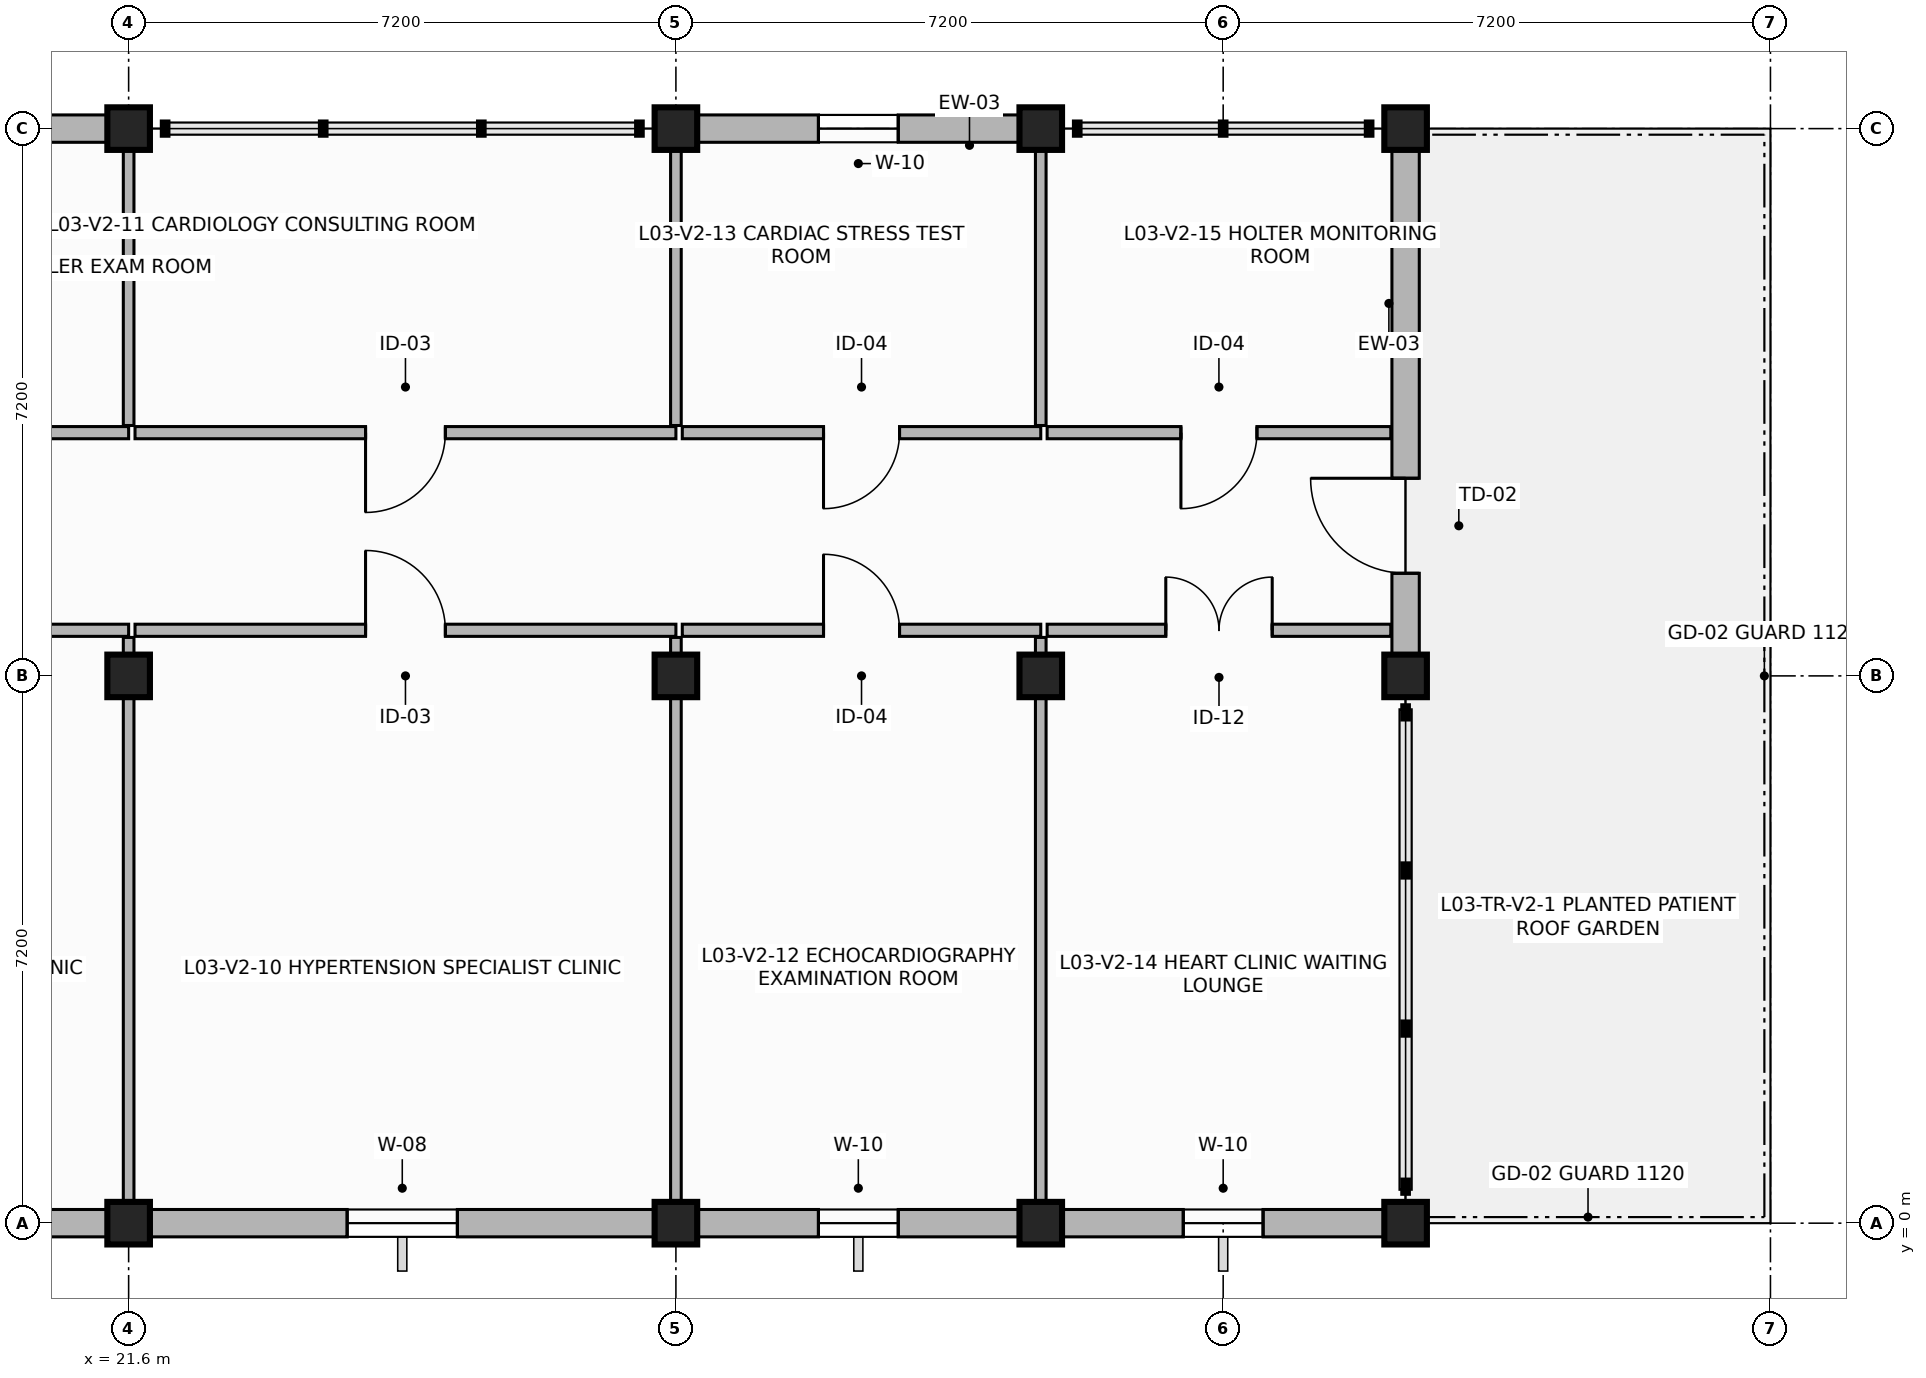
"""IFC4 building model, lengths in metres.
Left out: names, types, materials, properties, quantities, classifications, styles, units other than length and angle.
Written with IfcOpenShell. Run it as: python <this file> out.ifc"""

import sys

from ifc_helpers import new_model, si_unit, direction, frame, frame_2d, origin, origin_2d, place, context, subcontext, project, spatial, rectangle, extrude, element, fill, save


model = new_model("IFC4")
c1 = context("Model", 3, precision=1e-05, world=origin(), true_north=direction((0.0, 1.0)))
c2 = subcontext(c1, "Body", "Model", "MODEL_VIEW")
j1 = project(units=[si_unit("LENGTHUNIT", "METRE"), si_unit("PLANEANGLEUNIT", "RADIAN")], contexts=[c1])
p1 = place(None, origin())
s1 = spatial("IfcSite", under=j1, at=p1, CompositionType="ELEMENT")
p2 = place(p1, origin())
s2 = spatial("IfcBuilding", under=s1, at=p2, CompositionType="ELEMENT")
p3 = place(p2, frame((0.0, 0.0, 12.3)))
s3 = spatial("IfcBuildingStorey", under=s2, at=p3, CompositionType="ELEMENT", Elevation=12.3)
for number, where, z_axis, x_axis in (
    (1, (21.6, 0.0, 0.0), (0.0, 0.0, 1.0), (1.0, 0.0, 0.0)),
    (2, (21.6, 7.2, 0.0), (0.0, 0.0, 1.0), (1.0, 0.0, 0.0)),
    (3, (21.6, 14.4, 0.0), (0.0, 0.0, 1.0), (1.0, 0.0, 0.0)),
    (4, (28.8, 0.0, 0.0), (0.0, 0.0, 1.0), (1.0, 0.0, 0.0)),
    (5, (28.8, 7.2, 0.0), (0.0, 0.0, 1.0), (1.0, 0.0, 0.0)),
    (6, (28.8, 14.4, 0.0), (0.0, 0.0, 1.0), (1.0, 0.0, 0.0)),
    (7, (33.6, 0.0, 0.0), (0.0, 0.0, 1.0), (1.0, 0.0, 0.0)),
    (8, (33.6, 7.2, 0.0), (0.0, 0.0, 1.0), (1.0, 0.0, 0.0)),
    (9, (33.6, 14.4, 0.0), (0.0, 0.0, 1.0), (1.0, 0.0, 0.0)),
    (10, (38.4, 0.0, 0.0), (0.0, 0.0, 1.0), (1.0, 0.0, 0.0)),
    (11, (38.4, 7.2, 0.0), (0.0, 0.0, 1.0), (1.0, 0.0, 0.0)),
    (12, (38.4, 14.4, 0.0), (0.0, 0.0, 1.0), (1.0, 0.0, 0.0)),
):
    element("IfcColumn", number, at=place(p3, frame(where, z_axis=z_axis, x_axis=x_axis)), inside=s3, PredefinedType="COLUMN", context=c2, shape_type="SweptSolid", body=[
        extrude(rectangle(XDim=0.56, YDim=0.56, at=origin_2d()), origin(), (0.0, 0.0, 1.0), 3.42),
    ])
p4 = place(p3, frame((14.4, 0.0, 0.0), z_axis=(0.0, 0.0, 1.0), x_axis=(1.0, 0.0, 0.0)))
e13 = element("IfcWall", 13, at=p4, inside=s3, PredefinedType="SOLIDWALL", context=c2, shape_type="SweptSolid", body=[
    extrude(rectangle(XDim=7.2, YDim=0.36, at=frame_2d((3.6, 0.0))), origin(), (0.0, 0.0, 1.0), 2.8),
])
p5 = place(p4, frame((2.875, 0.0, 0.85)))
e14 = element("IfcOpeningElement", 14, at=p5, cuts=e13, PredefinedType="OPENING", context=c2, shape_type="SweptSolid", body=[
    extrude(rectangle(XDim=1.45, YDim=1.75, at=frame_2d((0.725, 0.875))), frame((0.0, 0.19, 0.0), z_axis=(0.0, -1.0, 0.0), x_axis=(1.0, 0.0, 0.0)), (0.0, 0.0, 1.0), 0.38),
])
p6 = place(p3, frame((21.6, 0.0, 0.0), z_axis=(0.0, 0.0, 1.0), x_axis=(1.0, 0.0, 0.0)))
e15 = element("IfcWall", 15, at=p6, inside=s3, PredefinedType="SOLIDWALL", context=c2, shape_type="SweptSolid", body=[
    extrude(rectangle(XDim=7.2, YDim=0.36, at=frame_2d((3.6, 0.0))), origin(), (0.0, 0.0, 1.0), 2.8),
])
p7 = place(p6, frame((2.875, 0.0, 0.85)))
e16 = element("IfcOpeningElement", 16, at=p7, cuts=e15, PredefinedType="OPENING", context=c2, shape_type="SweptSolid", body=[
    extrude(rectangle(XDim=1.45, YDim=1.75, at=frame_2d((0.725, 0.875))), frame((0.0, 0.19, 0.0), z_axis=(0.0, -1.0, 0.0), x_axis=(1.0, 0.0, 0.0)), (0.0, 0.0, 1.0), 0.38),
])
p8 = place(p3, frame((28.8, 0.0, 0.0), z_axis=(0.0, 0.0, 1.0), x_axis=(1.0, 0.0, 0.0)))
e17 = element("IfcWall", 17, at=p8, inside=s3, PredefinedType="SOLIDWALL", context=c2, shape_type="SweptSolid", body=[
    extrude(rectangle(XDim=4.8, YDim=0.36, at=frame_2d((2.4, 0.0))), origin(), (0.0, 0.0, 1.0), 2.8),
])
p9 = place(p8, frame((1.875, 0.0, 0.85)))
e18 = element("IfcOpeningElement", 18, at=p9, cuts=e17, PredefinedType="OPENING", context=c2, shape_type="SweptSolid", body=[
    extrude(rectangle(XDim=1.05, YDim=1.7, at=frame_2d((0.525, 0.85))), frame((0.0, 0.19, 0.0), z_axis=(0.0, -1.0, 0.0), x_axis=(1.0, 0.0, 0.0)), (0.0, 0.0, 1.0), 0.38),
])
p10 = place(p3, frame((33.6, 0.0, 0.0), z_axis=(0.0, 0.0, 1.0), x_axis=(1.0, 0.0, 0.0)))
e19 = element("IfcWall", 19, at=p10, inside=s3, PredefinedType="SOLIDWALL", context=c2, shape_type="SweptSolid", body=[
    extrude(rectangle(XDim=4.8, YDim=0.36, at=frame_2d((2.4, 0.0))), origin(), (0.0, 0.0, 1.0), 2.8),
])
p11 = place(p10, frame((1.875, 0.0, 0.85)))
e20 = element("IfcOpeningElement", 20, at=p11, cuts=e19, PredefinedType="OPENING", context=c2, shape_type="SweptSolid", body=[
    extrude(rectangle(XDim=1.05, YDim=1.7, at=frame_2d((0.525, 0.85))), frame((0.0, 0.19, 0.0), z_axis=(0.0, -1.0, 0.0), x_axis=(1.0, 0.0, 0.0)), (0.0, 0.0, 1.0), 0.38),
])
p12 = place(p3, frame((38.4, 7.2, 0.0), z_axis=(0.0, 0.0, 1.0), x_axis=(0.0, 1.0, 0.0)))
e21 = element("IfcWall", 21, at=p12, inside=s3, PredefinedType="SOLIDWALL", context=c2, shape_type="SweptSolid", body=[
    extrude(rectangle(XDim=7.2, YDim=0.36, at=frame_2d((3.6, 0.0))), origin(), (0.0, 0.0, 1.0), 2.8),
])
p13 = place(p12, frame((1.35, 0.0, 0.0)))
e22 = element("IfcOpeningElement", 22, at=p13, cuts=e21, PredefinedType="OPENING", context=c2, shape_type="SweptSolid", body=[
    extrude(rectangle(XDim=1.25, YDim=2.25, at=frame_2d((0.625, 1.125))), frame((0.0, 0.19, 0.0), z_axis=(0.0, -1.0, 0.0), x_axis=(1.0, 0.0, 0.0)), (0.0, 0.0, 1.0), 0.38),
])
p14 = place(p3, frame((33.6, 14.4, 0.0), z_axis=(0.0, 0.0, 1.0), x_axis=(-1.0, 0.0, 0.0)))
e23 = element("IfcWall", 23, at=p14, inside=s3, PredefinedType="SOLIDWALL", context=c2, shape_type="SweptSolid", body=[
    extrude(rectangle(XDim=4.8, YDim=0.36, at=frame_2d((2.4, 0.0))), origin(), (0.0, 0.0, 1.0), 2.8),
])
p15 = place(p14, frame((1.875, 0.0, 0.85)))
e24 = element("IfcOpeningElement", 24, at=p15, cuts=e23, PredefinedType="OPENING", context=c2, shape_type="SweptSolid", body=[
    extrude(rectangle(XDim=1.05, YDim=1.7, at=frame_2d((0.525, 0.85))), frame((0.0, 0.19, 0.0), z_axis=(0.0, -1.0, 0.0), x_axis=(1.0, 0.0, 0.0)), (0.0, 0.0, 1.0), 0.38),
])
p16 = place(p3, frame((21.6, 14.4, 0.0), z_axis=(0.0, 0.0, 1.0), x_axis=(-1.0, 0.0, 0.0)))
e25 = element("IfcWall", 25, at=p16, inside=s3, PredefinedType="SOLIDWALL", context=c2, shape_type="SweptSolid", body=[
    extrude(rectangle(XDim=7.2, YDim=0.36, at=frame_2d((3.6, 0.0))), origin(), (0.0, 0.0, 1.0), 2.8),
])
p17 = place(p16, frame((2.775, 0.0, 0.85)))
e26 = element("IfcOpeningElement", 26, at=p17, cuts=e25, PredefinedType="OPENING", context=c2, shape_type="SweptSolid", body=[
    extrude(rectangle(XDim=1.65, YDim=1.75, at=frame_2d((0.825, 0.875))), frame((0.0, 0.19, 0.0), z_axis=(0.0, -1.0, 0.0), x_axis=(1.0, 0.0, 0.0)), (0.0, 0.0, 1.0), 0.38),
])
p18 = place(p3, frame((14.484, 7.8, 0.0), z_axis=(0.0, 0.0, 1.0), x_axis=(1.0, 0.0, 0.0)))
e27 = element("IfcWall", 27, at=p18, inside=s3, PredefinedType="PARTITIONING", context=c2, shape_type="SweptSolid", body=[
    extrude(rectangle(XDim=7.116, YDim=0.16, at=frame_2d((3.558, 0.0))), origin(), (0.0, 0.0, 1.0), 2.78),
])
p19 = place(p18, frame((3.033, 0.0, 0.0)))
e28 = element("IfcOpeningElement", 28, at=p19, cuts=e27, PredefinedType="OPENING", context=c2, shape_type="SweptSolid", body=[
    extrude(rectangle(XDim=1.05, YDim=2.15, at=frame_2d((0.525, 1.075))), frame((0.0, 0.09, 0.0), z_axis=(0.0, -1.0, 0.0), x_axis=(1.0, 0.0, 0.0)), (0.0, 0.0, 1.0), 0.18),
])
p20 = place(p3, frame((21.6, 7.706, 0.0), z_axis=(0.0, 0.0, 1.0), x_axis=(0.0, -1.0, 0.0)))
e29 = element("IfcWall", 29, at=p20, inside=s3, PredefinedType="PARTITIONING", context=c2, shape_type="SweptSolid", body=[
    extrude(rectangle(XDim=7.511, YDim=0.14, at=frame_2d((3.755, 0.0))), origin(), (0.0, 0.0, 1.0), 2.78),
])
p21 = place(p3, frame((21.6, 10.4, 0.0), z_axis=(0.0, 0.0, 1.0), x_axis=(-1.0, 0.0, 0.0)))
e30 = element("IfcWall", 30, at=p21, inside=s3, PredefinedType="PARTITIONING", context=c2, shape_type="SweptSolid", body=[
    extrude(rectangle(XDim=7.2, YDim=0.16, at=frame_2d((3.6, 0.0))), origin(), (0.0, 0.0, 1.0), 2.78),
])
p22 = place(p21, frame((3.1, 0.0, 0.0)))
e31 = element("IfcOpeningElement", 31, at=p22, cuts=e30, PredefinedType="OPENING", context=c2, shape_type="SweptSolid", body=[
    extrude(rectangle(XDim=1.0, YDim=2.15, at=frame_2d((0.5, 1.075))), frame((0.0, 0.09, 0.0), z_axis=(0.0, -1.0, 0.0), x_axis=(1.0, 0.0, 0.0)), (0.0, 0.0, 1.0), 0.18),
])
p23 = place(p3, frame((21.6, 14.205, 0.0), z_axis=(0.0, 0.0, 1.0), x_axis=(0.0, -1.0, 0.0)))
e32 = element("IfcWall", 32, at=p23, inside=s3, PredefinedType="PARTITIONING", context=c2, shape_type="SweptSolid", body=[
    extrude(rectangle(XDim=3.711, YDim=0.14, at=frame_2d((1.855, 0.0))), origin(), (0.0, 0.0, 1.0), 2.78),
])
p24 = place(p3, frame((21.684, 7.8, 0.0), z_axis=(0.0, 0.0, 1.0), x_axis=(1.0, 0.0, 0.0)))
e33 = element("IfcWall", 33, at=p24, inside=s3, PredefinedType="PARTITIONING", context=c2, shape_type="SweptSolid", body=[
    extrude(rectangle(XDim=7.116, YDim=0.16, at=frame_2d((3.558, 0.0))), origin(), (0.0, 0.0, 1.0), 2.78),
])
p25 = place(p24, frame((3.033, 0.0, 0.0)))
e34 = element("IfcOpeningElement", 34, at=p25, cuts=e33, PredefinedType="OPENING", context=c2, shape_type="SweptSolid", body=[
    extrude(rectangle(XDim=1.05, YDim=2.15, at=frame_2d((0.525, 1.075))), frame((0.0, 0.09, 0.0), z_axis=(0.0, -1.0, 0.0), x_axis=(1.0, 0.0, 0.0)), (0.0, 0.0, 1.0), 0.18),
])
p26 = place(p3, frame((28.8, 7.706, 0.0), z_axis=(0.0, 0.0, 1.0), x_axis=(0.0, -1.0, 0.0)))
e35 = element("IfcWall", 35, at=p26, inside=s3, PredefinedType="PARTITIONING", context=c2, shape_type="SweptSolid", body=[
    extrude(rectangle(XDim=7.511, YDim=0.14, at=frame_2d((3.755, 0.0))), origin(), (0.0, 0.0, 1.0), 2.78),
])
p27 = place(p3, frame((28.8, 10.4, 0.0), z_axis=(0.0, 0.0, 1.0), x_axis=(-1.0, 0.0, 0.0)))
e36 = element("IfcWall", 36, at=p27, inside=s3, PredefinedType="PARTITIONING", context=c2, shape_type="SweptSolid", body=[
    extrude(rectangle(XDim=7.116, YDim=0.16, at=frame_2d((3.558, 0.0))), origin(), (0.0, 0.0, 1.0), 2.78),
])
p28 = place(p27, frame((3.033, 0.0, 0.0)))
e37 = element("IfcOpeningElement", 37, at=p28, cuts=e36, PredefinedType="OPENING", context=c2, shape_type="SweptSolid", body=[
    extrude(rectangle(XDim=1.05, YDim=2.15, at=frame_2d((0.525, 1.075))), frame((0.0, 0.09, 0.0), z_axis=(0.0, -1.0, 0.0), x_axis=(1.0, 0.0, 0.0)), (0.0, 0.0, 1.0), 0.18),
])
p29 = place(p3, frame((28.8, 14.205, 0.0), z_axis=(0.0, 0.0, 1.0), x_axis=(0.0, -1.0, 0.0)))
e38 = element("IfcWall", 38, at=p29, inside=s3, PredefinedType="PARTITIONING", context=c2, shape_type="SweptSolid", body=[
    extrude(rectangle(XDim=3.711, YDim=0.14, at=frame_2d((1.855, 0.0))), origin(), (0.0, 0.0, 1.0), 2.78),
])
p30 = place(p3, frame((28.884, 7.8, 0.0), z_axis=(0.0, 0.0, 1.0), x_axis=(1.0, 0.0, 0.0)))
e39 = element("IfcWall", 39, at=p30, inside=s3, PredefinedType="PARTITIONING", context=c2, shape_type="SweptSolid", body=[
    extrude(rectangle(XDim=4.716, YDim=0.16, at=frame_2d((2.358, 0.0))), origin(), (0.0, 0.0, 1.0), 2.78),
])
p31 = place(p30, frame((1.858, 0.0, 0.0)))
e40 = element("IfcOpeningElement", 40, at=p31, cuts=e39, PredefinedType="OPENING", context=c2, shape_type="SweptSolid", body=[
    extrude(rectangle(XDim=1.0, YDim=2.15, at=frame_2d((0.5, 1.075))), frame((0.0, 0.09, 0.0), z_axis=(0.0, -1.0, 0.0), x_axis=(1.0, 0.0, 0.0)), (0.0, 0.0, 1.0), 0.18),
])
p32 = place(p3, frame((33.6, 7.706, 0.0), z_axis=(0.0, 0.0, 1.0), x_axis=(0.0, -1.0, 0.0)))
e41 = element("IfcWall", 41, at=p32, inside=s3, PredefinedType="PARTITIONING", context=c2, shape_type="SweptSolid", body=[
    extrude(rectangle(XDim=7.511, YDim=0.14, at=frame_2d((3.755, 0.0))), origin(), (0.0, 0.0, 1.0), 2.78),
])
p33 = place(p3, frame((33.6, 10.4, 0.0), z_axis=(0.0, 0.0, 1.0), x_axis=(-1.0, 0.0, 0.0)))
e42 = element("IfcWall", 42, at=p33, inside=s3, PredefinedType="PARTITIONING", context=c2, shape_type="SweptSolid", body=[
    extrude(rectangle(XDim=4.716, YDim=0.16, at=frame_2d((2.358, 0.0))), origin(), (0.0, 0.0, 1.0), 2.78),
])
p34 = place(p33, frame((1.858, 0.0, 0.0)))
e43 = element("IfcOpeningElement", 43, at=p34, cuts=e42, PredefinedType="OPENING", context=c2, shape_type="SweptSolid", body=[
    extrude(rectangle(XDim=1.0, YDim=2.15, at=frame_2d((0.5, 1.075))), frame((0.0, 0.09, 0.0), z_axis=(0.0, -1.0, 0.0), x_axis=(1.0, 0.0, 0.0)), (0.0, 0.0, 1.0), 0.18),
])
p35 = place(p3, frame((33.6, 14.205, 0.0), z_axis=(0.0, 0.0, 1.0), x_axis=(0.0, -1.0, 0.0)))
e44 = element("IfcWall", 44, at=p35, inside=s3, PredefinedType="PARTITIONING", context=c2, shape_type="SweptSolid", body=[
    extrude(rectangle(XDim=3.711, YDim=0.14, at=frame_2d((1.855, 0.0))), origin(), (0.0, 0.0, 1.0), 2.78),
])
p36 = place(p3, frame((33.684, 7.8, 0.0), z_axis=(0.0, 0.0, 1.0), x_axis=(1.0, 0.0, 0.0)))
e45 = element("IfcWall", 45, at=p36, inside=s3, PredefinedType="PARTITIONING", context=c2, shape_type="SweptSolid", body=[
    extrude(rectangle(XDim=4.521, YDim=0.16, at=frame_2d((2.26, 0.0))), origin(), (0.0, 0.0, 1.0), 2.78),
])
p37 = place(p36, frame((1.561, 0.0, 0.0)))
e46 = element("IfcOpeningElement", 46, at=p37, cuts=e45, PredefinedType="OPENING", context=c2, shape_type="SweptSolid", body=[
    extrude(rectangle(XDim=1.4, YDim=2.3, at=frame_2d((0.7, 1.15))), frame((0.0, 0.09, 0.0), z_axis=(0.0, -1.0, 0.0), x_axis=(1.0, 0.0, 0.0)), (0.0, 0.0, 1.0), 0.18),
])
p38 = place(p3, frame((38.205, 10.4, 0.0), z_axis=(0.0, 0.0, 1.0), x_axis=(-1.0, 0.0, 0.0)))
e47 = element("IfcWall", 47, at=p38, inside=s3, PredefinedType="PARTITIONING", context=c2, shape_type="SweptSolid", body=[
    extrude(rectangle(XDim=4.521, YDim=0.16, at=frame_2d((2.26, 0.0))), origin(), (0.0, 0.0, 1.0), 2.78),
])
p39 = place(p38, frame((1.761, 0.0, 0.0)))
e48 = element("IfcOpeningElement", 48, at=p39, cuts=e47, PredefinedType="OPENING", context=c2, shape_type="SweptSolid", body=[
    extrude(rectangle(XDim=1.0, YDim=2.15, at=frame_2d((0.5, 1.075))), frame((0.0, 0.09, 0.0), z_axis=(0.0, -1.0, 0.0), x_axis=(1.0, 0.0, 0.0)), (0.0, 0.0, 1.0), 0.18),
])
p40 = place(p7, origin())
e49 = element("IfcWindow", 49, at=p40, inside=s3, PartitioningType="SINGLE_PANEL", PredefinedType="WINDOW", context=c2, shape_type="SweptSolid", body=[
    extrude(rectangle(XDim=1.45, YDim=1.75, at=frame_2d((0.725, 0.875))), frame((0.0, 0.03, 0.0), z_axis=(0.0, -1.0, 0.0), x_axis=(1.0, 0.0, 0.0)), (0.0, 0.0, 1.0), 0.06),
])
fill(e16, e49)
p41 = place(p9, origin())
e50 = element("IfcWindow", 50, at=p41, inside=s3, PartitioningType="SINGLE_PANEL", PredefinedType="WINDOW", context=c2, shape_type="SweptSolid", body=[
    extrude(rectangle(XDim=1.05, YDim=1.7, at=frame_2d((0.525, 0.85))), frame((0.0, 0.03, 0.0), z_axis=(0.0, -1.0, 0.0), x_axis=(1.0, 0.0, 0.0)), (0.0, 0.0, 1.0), 0.06),
])
fill(e18, e50)
p42 = place(p11, origin())
e51 = element("IfcWindow", 51, at=p42, inside=s3, PartitioningType="SINGLE_PANEL", PredefinedType="WINDOW", context=c2, shape_type="SweptSolid", body=[
    extrude(rectangle(XDim=1.05, YDim=1.7, at=frame_2d((0.525, 0.85))), frame((0.0, 0.03, 0.0), z_axis=(0.0, -1.0, 0.0), x_axis=(1.0, 0.0, 0.0)), (0.0, 0.0, 1.0), 0.06),
])
fill(e20, e51)
p43 = place(p13, origin())
e52 = element("IfcDoor", 52, at=p43, inside=s3, OperationType="SINGLE_SWING_RIGHT", PredefinedType="DOOR", context=c2, shape_type="SweptSolid", body=[
    extrude(rectangle(XDim=1.25, YDim=2.25, at=frame_2d((0.625, 1.125))), frame((0.0, 0.025, 0.0), z_axis=(0.0, -1.0, 0.0), x_axis=(1.0, 0.0, 0.0)), (0.0, 0.0, 1.0), 0.05),
])
fill(e22, e52)
p44 = place(p15, origin())
e53 = element("IfcWindow", 53, at=p44, inside=s3, PartitioningType="SINGLE_PANEL", PredefinedType="WINDOW", context=c2, shape_type="SweptSolid", body=[
    extrude(rectangle(XDim=1.05, YDim=1.7, at=frame_2d((0.525, 0.85))), frame((0.0, 0.03, 0.0), z_axis=(0.0, -1.0, 0.0), x_axis=(1.0, 0.0, 0.0)), (0.0, 0.0, 1.0), 0.06),
])
fill(e24, e53)
p45 = place(p25, origin())
e54 = element("IfcDoor", 54, at=p45, inside=s3, OperationType="SINGLE_SWING_LEFT", PredefinedType="DOOR", context=c2, shape_type="SweptSolid", body=[
    extrude(rectangle(XDim=1.05, YDim=2.15, at=frame_2d((0.525, 1.075))), frame((0.0, 0.025, 0.0), z_axis=(0.0, -1.0, 0.0), x_axis=(1.0, 0.0, 0.0)), (0.0, 0.0, 1.0), 0.05),
])
fill(e34, e54)
p46 = place(p28, origin())
e55 = element("IfcDoor", 55, at=p46, inside=s3, OperationType="SINGLE_SWING_RIGHT", PredefinedType="DOOR", context=c2, shape_type="SweptSolid", body=[
    extrude(rectangle(XDim=1.05, YDim=2.15, at=frame_2d((0.525, 1.075))), frame((0.0, 0.025, 0.0), z_axis=(0.0, -1.0, 0.0), x_axis=(1.0, 0.0, 0.0)), (0.0, 0.0, 1.0), 0.05),
])
fill(e37, e55)
p47 = place(p31, origin())
e56 = element("IfcDoor", 56, at=p47, inside=s3, OperationType="SINGLE_SWING_LEFT", PredefinedType="DOOR", context=c2, shape_type="SweptSolid", body=[
    extrude(rectangle(XDim=1.0, YDim=2.15, at=frame_2d((0.5, 1.075))), frame((0.0, 0.025, 0.0), z_axis=(0.0, -1.0, 0.0), x_axis=(1.0, 0.0, 0.0)), (0.0, 0.0, 1.0), 0.05),
])
fill(e40, e56)
p48 = place(p34, origin())
e57 = element("IfcDoor", 57, at=p48, inside=s3, OperationType="SINGLE_SWING_RIGHT", PredefinedType="DOOR", context=c2, shape_type="SweptSolid", body=[
    extrude(rectangle(XDim=1.0, YDim=2.15, at=frame_2d((0.5, 1.075))), frame((0.0, 0.025, 0.0), z_axis=(0.0, -1.0, 0.0), x_axis=(1.0, 0.0, 0.0)), (0.0, 0.0, 1.0), 0.05),
])
fill(e43, e57)
p49 = place(p37, origin())
e58 = element("IfcDoor", 58, at=p49, inside=s3, OperationType="DOUBLE_DOOR_SINGLE_SWING", PredefinedType="DOOR", context=c2, shape_type="SweptSolid", body=[
    extrude(rectangle(XDim=1.4, YDim=2.3, at=frame_2d((0.7, 1.15))), frame((0.0, 0.025, 0.0), z_axis=(0.0, -1.0, 0.0), x_axis=(1.0, 0.0, 0.0)), (0.0, 0.0, 1.0), 0.05),
])
fill(e46, e58)
p50 = place(p39, origin())
e59 = element("IfcDoor", 59, at=p50, inside=s3, OperationType="SINGLE_SWING_RIGHT", PredefinedType="DOOR", context=c2, shape_type="SweptSolid", body=[
    extrude(rectangle(XDim=1.0, YDim=2.15, at=frame_2d((0.5, 1.075))), frame((0.0, 0.025, 0.0), z_axis=(0.0, -1.0, 0.0), x_axis=(1.0, 0.0, 0.0)), (0.0, 0.0, 1.0), 0.05),
])
fill(e48, e59)
save(model, sys.argv[1])
